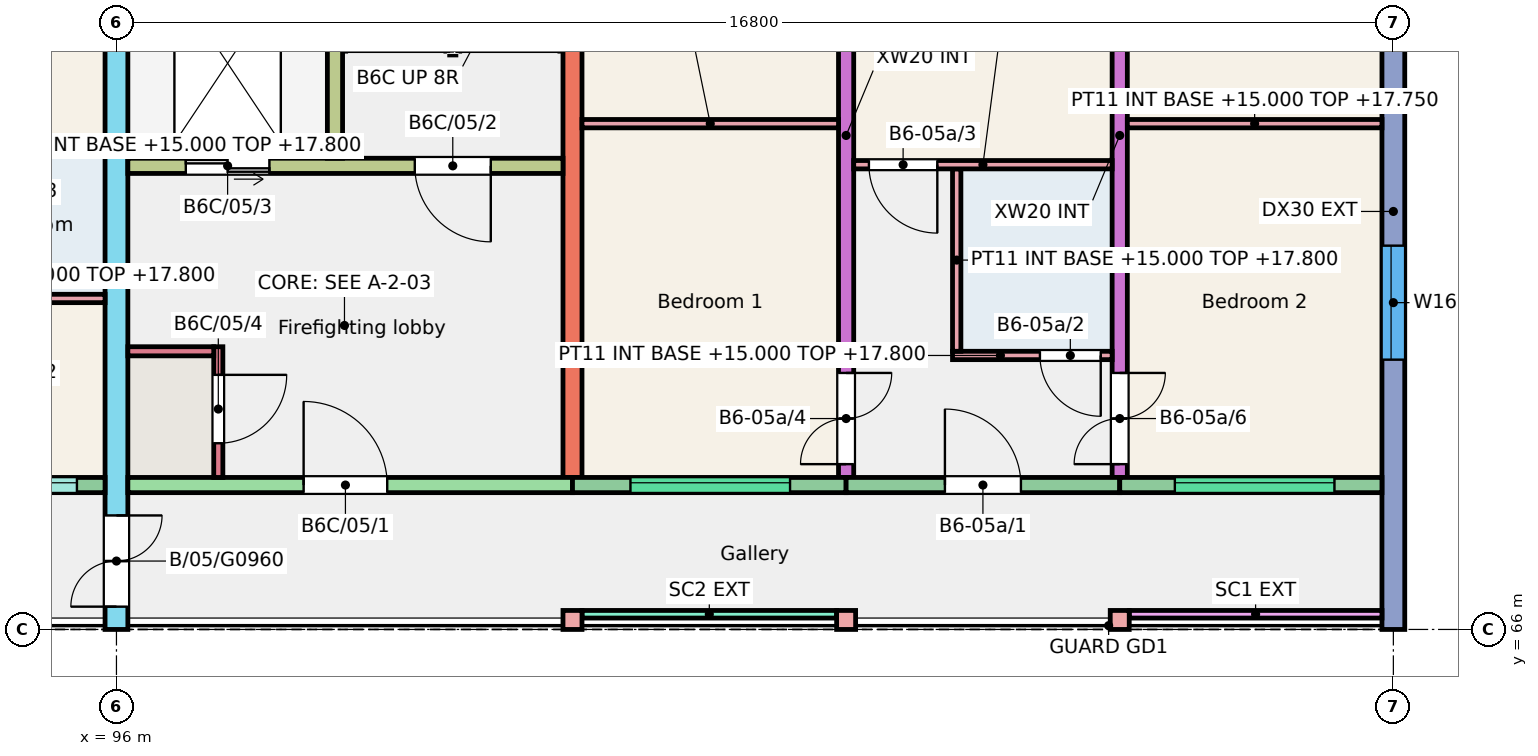
"""IFC4 building model, lengths in metres.
Left out: names, types, materials, properties, quantities, classifications, styles, units other than length and angle.
Written with IfcOpenShell. Run it as: python <this file> out.ifc"""

import sys

from ifc_helpers import new_model, si_unit, direction, frame, frame_2d, origin, origin_2d, place, context, subcontext, project, spatial, rectangle, extrude, element, fill, save


model = new_model("IFC4")
c1 = context("Model", 3, precision=1e-05, world=origin(), true_north=direction((0.0, 1.0)))
c2 = subcontext(c1, "Body", "Model", "MODEL_VIEW")
j1 = project(units=[si_unit("LENGTHUNIT", "METRE"), si_unit("PLANEANGLEUNIT", "RADIAN")], contexts=[c1])
p1 = place(None, origin())
s1 = spatial("IfcSite", under=j1, at=p1, CompositionType="ELEMENT")
p2 = place(p1, origin())
s2 = spatial("IfcBuilding", under=s1, at=p2, CompositionType="ELEMENT")
p3 = place(p2, frame((0.0, 0.0, 15.0)))
s3 = spatial("IfcBuildingStorey", under=s2, at=p3, CompositionType="ELEMENT", Elevation=15.0)
p4 = place(p3, frame((96.0, 66.0, 0.0), z_axis=(0.0, 0.0, 1.0), x_axis=(0.0, 1.0, 0.0)))
e1 = element("IfcWall", 1, at=p4, inside=s3, PredefinedType="SHEAR", context=c2, shape_type="SweptSolid", body=[
    extrude(rectangle(XDim=11.0, YDim=0.3, at=frame_2d((5.5, 0.0))), origin(), (0.0, 0.0, 1.0), 3.0),
])
p5 = place(p4, frame((0.3, 0.0, 0.0)))
e2 = element("IfcOpeningElement", 2, at=p5, cuts=e1, PredefinedType="OPENING", context=c2, shape_type="SweptSolid", body=[
    extrude(rectangle(XDim=1.2, YDim=2.1, at=frame_2d((0.6, 1.05))), frame((0.0, 0.16, 0.0), z_axis=(0.0, -1.0, 0.0), x_axis=(1.0, 0.0, 0.0)), (0.0, 0.0, 1.0), 0.32),
])
p6 = place(p3, frame((102.0, 68.0, 0.0), z_axis=(0.0, 0.0, 1.0), x_axis=(0.0, 1.0, 0.0)))
e3 = element("IfcWall", 3, at=p6, inside=s3, PredefinedType="SHEAR", context=c2, shape_type="SweptSolid", body=[
    extrude(rectangle(XDim=9.0, YDim=0.25, at=frame_2d((4.5, 0.0))), origin(), (0.0, 0.0, 1.0), 3.0),
])
p7 = place(p3, frame((105.6, 68.0, 0.0), z_axis=(0.0, 0.0, 1.0), x_axis=(0.0, 1.0, 0.0)))
e4 = element("IfcWall", 4, at=p7, inside=s3, PredefinedType="SHEAR", context=c2, shape_type="SweptSolid", body=[
    extrude(rectangle(XDim=9.0, YDim=0.2, at=frame_2d((4.5, 0.0))), origin(), (0.0, 0.0, 1.0), 3.0),
])
p8 = place(p7, frame((0.175, 0.0, 0.0)))
e5 = element("IfcOpeningElement", 5, at=p8, cuts=e4, PredefinedType="OPENING", context=c2, shape_type="SweptSolid", body=[
    extrude(rectangle(XDim=1.2, YDim=2.1, at=frame_2d((0.6, 1.05))), frame((0.0, 0.11, 0.0), z_axis=(0.0, -1.0, 0.0), x_axis=(1.0, 0.0, 0.0)), (0.0, 0.0, 1.0), 0.22),
])
p9 = place(p7, frame((6.4, 0.0, 0.0)))
e6 = element("IfcOpeningElement", 6, at=p9, cuts=e4, PredefinedType="OPENING", context=c2, shape_type="SweptSolid", body=[
    extrude(rectangle(XDim=1.2, YDim=2.1, at=frame_2d((0.6, 1.05))), frame((0.0, 0.11, 0.0), z_axis=(0.0, -1.0, 0.0), x_axis=(1.0, 0.0, 0.0)), (0.0, 0.0, 1.0), 0.22),
])
p10 = place(p3, frame((109.2, 68.0, 0.0), z_axis=(0.0, 0.0, 1.0), x_axis=(0.0, 1.0, 0.0)))
e7 = element("IfcWall", 7, at=p10, inside=s3, PredefinedType="SHEAR", context=c2, shape_type="SweptSolid", body=[
    extrude(rectangle(XDim=9.0, YDim=0.2, at=frame_2d((4.5, 0.0))), origin(), (0.0, 0.0, 1.0), 3.0),
])
p11 = place(p10, frame((0.175, 0.0, 0.0)))
e8 = element("IfcOpeningElement", 8, at=p11, cuts=e7, PredefinedType="OPENING", context=c2, shape_type="SweptSolid", body=[
    extrude(rectangle(XDim=1.2, YDim=2.1, at=frame_2d((0.6, 1.05))), frame((0.0, 0.11, 0.0), z_axis=(0.0, -1.0, 0.0), x_axis=(1.0, 0.0, 0.0)), (0.0, 0.0, 1.0), 0.22),
])
p12 = place(p10, frame((6.4, 0.0, 0.0)))
e9 = element("IfcOpeningElement", 9, at=p12, cuts=e7, PredefinedType="OPENING", context=c2, shape_type="SweptSolid", body=[
    extrude(rectangle(XDim=1.2, YDim=2.1, at=frame_2d((0.6, 1.05))), frame((0.0, 0.11, 0.0), z_axis=(0.0, -1.0, 0.0), x_axis=(1.0, 0.0, 0.0)), (0.0, 0.0, 1.0), 0.22),
])
p13 = place(p3, frame((112.8, 66.0, 0.0), z_axis=(0.0, 0.0, 1.0), x_axis=(0.0, 1.0, 0.0)))
e10 = element("IfcWall", 10, at=p13, inside=s3, PredefinedType="SHEAR", context=c2, shape_type="SweptSolid", body=[
    extrude(rectangle(XDim=11.0, YDim=0.3, at=frame_2d((5.5, 0.0))), origin(), (0.0, 0.0, 1.0), 3.0),
])
p14 = place(p13, frame((3.55, 0.0, 0.9)))
e11 = element("IfcOpeningElement", 11, at=p14, cuts=e10, PredefinedType="OPENING", context=c2, shape_type="SweptSolid", body=[
    extrude(rectangle(XDim=1.5, YDim=1.5, at=frame_2d((0.75, 0.75))), frame((0.0, 0.16, 0.0), z_axis=(0.0, -1.0, 0.0), x_axis=(1.0, 0.0, 0.0)), (0.0, 0.0, 1.0), 0.32),
])
p15 = place(p13, frame((8.255, 0.0, 0.9)))
e12 = element("IfcOpeningElement", 12, at=p15, cuts=e10, PredefinedType="OPENING", context=c2, shape_type="SweptSolid", body=[
    extrude(rectangle(XDim=1.2, YDim=1.5, at=frame_2d((0.6, 0.75))), frame((0.0, 0.16, 0.0), z_axis=(0.0, -1.0, 0.0), x_axis=(1.0, 0.0, 0.0)), (0.0, 0.0, 1.0), 0.32),
])
p16 = place(p3, frame((92.4, 67.9, 0.0), z_axis=(0.0, 0.0, 1.0), x_axis=(1.0, 0.0, 0.0)))
e13 = element("IfcWall", 13, at=p16, inside=s3, PredefinedType="SOLIDWALL", context=c2, shape_type="SweptSolid", body=[
    extrude(rectangle(XDim=3.45, YDim=0.2, at=frame_2d((1.725, 0.0))), origin(), (0.0, 0.0, 1.0), 3.0),
])
p17 = place(p16, frame((1.88, 0.0, 1.1)))
e14 = element("IfcOpeningElement", 14, at=p17, cuts=e13, PredefinedType="OPENING", context=c2, shape_type="SweptSolid", body=[
    extrude(rectangle(XDim=1.2, YDim=1.3, at=frame_2d((0.6, 0.65))), frame((0.0, 0.11, 0.0), z_axis=(0.0, -1.0, 0.0), x_axis=(1.0, 0.0, 0.0)), (0.0, 0.0, 1.0), 0.22),
])
p18 = place(p16, frame((0.25, 0.0, 0.0)))
e15 = element("IfcOpeningElement", 15, at=p18, cuts=e13, PredefinedType="OPENING", context=c2, shape_type="SweptSolid", body=[
    extrude(rectangle(XDim=1.0, YDim=2.1, at=frame_2d((0.5, 1.05))), frame((0.0, 0.11, 0.0), z_axis=(0.0, -1.0, 0.0), x_axis=(1.0, 0.0, 0.0)), (0.0, 0.0, 1.0), 0.22),
])
p19 = place(p3, frame((96.15, 67.9, 0.0), z_axis=(0.0, 0.0, 1.0), x_axis=(1.0, 0.0, 0.0)))
e16 = element("IfcWall", 16, at=p19, inside=s3, PredefinedType="SHEAR", context=c2, shape_type="SweptSolid", body=[
    extrude(rectangle(XDim=5.85, YDim=0.2, at=frame_2d((2.925, 0.0))), origin(), (0.0, 0.0, 1.0), 3.0),
])
p20 = place(p19, frame((2.312, 0.0, 0.0)))
e17 = element("IfcOpeningElement", 17, at=p20, cuts=e16, PredefinedType="OPENING", context=c2, shape_type="SweptSolid", body=[
    extrude(rectangle(XDim=1.1, YDim=2.1, at=frame_2d((0.55, 1.05))), frame((0.0, 0.11, 0.0), z_axis=(0.0, -1.0, 0.0), x_axis=(1.0, 0.0, 0.0)), (0.0, 0.0, 1.0), 0.22),
])
p21 = place(p3, frame((96.15, 72.1, 0.0), z_axis=(0.0, 0.0, 1.0), x_axis=(1.0, 0.0, 0.0)))
e18 = element("IfcWall", 18, at=p21, inside=s3, PredefinedType="SHEAR", context=c2, shape_type="SweptSolid", body=[
    extrude(rectangle(XDim=5.725, YDim=0.2, at=frame_2d((2.863, 0.0))), origin(), (0.0, 0.0, 1.0), 3.0),
])
p22 = place(p21, frame((3.775, 0.0, 0.0)))
e19 = element("IfcOpeningElement", 19, at=p22, cuts=e18, PredefinedType="OPENING", context=c2, shape_type="SweptSolid", body=[
    extrude(rectangle(XDim=1.0, YDim=2.1, at=frame_2d((0.5, 1.05))), frame((0.0, 0.11, 0.0), z_axis=(0.0, -1.0, 0.0), x_axis=(1.0, 0.0, 0.0)), (0.0, 0.0, 1.0), 0.22),
])
p23 = place(p21, frame((0.762, 0.0, 0.0)))
e20 = element("IfcOpeningElement", 20, at=p23, cuts=e18, PredefinedType="OPENING", context=c2, shape_type="SweptSolid", body=[
    extrude(rectangle(XDim=1.1, YDim=2.1, at=frame_2d((0.55, 1.05))), frame((0.0, 0.11, 0.0), z_axis=(0.0, -1.0, 0.0), x_axis=(1.0, 0.0, 0.0)), (0.0, 0.0, 1.0), 0.22),
])
p24 = place(p3, frame((98.875, 72.2, 0.0), z_axis=(0.0, 0.0, 1.0), x_axis=(0.0, 1.0, 0.0)))
e21 = element("IfcWall", 21, at=p24, inside=s3, PredefinedType="SHEAR", context=c2, shape_type="SweptSolid", body=[
    extrude(rectangle(XDim=4.8, YDim=0.2, at=frame_2d((2.4, 0.0))), origin(), (0.0, 0.0, 1.0), 3.0),
])
p25 = place(p3, frame((97.34, 68.0, 0.0), z_axis=(0.0, 0.0, 1.0), x_axis=(0.0, 1.0, 0.0)))
e22 = element("IfcWall", 22, at=p25, inside=s3, PredefinedType="SHEAR", context=c2, shape_type="SweptSolid", body=[
    extrude(rectangle(XDim=1.72, YDim=0.12, at=frame_2d((0.86, 0.0))), origin(), (0.0, 0.0, 1.0), 3.0),
])
p26 = place(p25, frame((0.45, 0.0, 0.0)))
e23 = element("IfcOpeningElement", 23, at=p26, cuts=e22, PredefinedType="OPENING", context=c2, shape_type="SweptSolid", body=[
    extrude(rectangle(XDim=0.9, YDim=2.1, at=frame_2d((0.45, 1.05))), frame((0.0, 0.07, 0.0), z_axis=(0.0, -1.0, 0.0), x_axis=(1.0, 0.0, 0.0)), (0.0, 0.0, 1.0), 0.14),
])
p27 = place(p3, frame((96.15, 69.66, 0.0), z_axis=(0.0, 0.0, 1.0), x_axis=(1.0, 0.0, 0.0)))
e24 = element("IfcWall", 24, at=p27, inside=s3, PredefinedType="SHEAR", context=c2, shape_type="SweptSolid", body=[
    extrude(rectangle(XDim=1.13, YDim=0.12, at=frame_2d((0.565, 0.0))), origin(), (0.0, 0.0, 1.0), 3.0),
])
p28 = place(p3, frame((102.0, 67.9, 0.0), z_axis=(0.0, 0.0, 1.0), x_axis=(1.0, 0.0, 0.0)))
e25 = element("IfcWall", 25, at=p28, inside=s3, PredefinedType="SOLIDWALL", context=c2, shape_type="SweptSolid", body=[
    extrude(rectangle(XDim=3.6, YDim=0.2, at=frame_2d((1.8, 0.0))), origin(), (0.0, 0.0, 1.0), 3.0),
])
p29 = place(p28, frame((0.762, 0.0, 1.2)))
e26 = element("IfcOpeningElement", 26, at=p29, cuts=e25, PredefinedType="OPENING", context=c2, shape_type="SweptSolid", body=[
    extrude(rectangle(XDim=2.1, YDim=1.2, at=frame_2d((1.05, 0.6))), frame((0.0, 0.11, 0.0), z_axis=(0.0, -1.0, 0.0), x_axis=(1.0, 0.0, 0.0)), (0.0, 0.0, 1.0), 0.22),
])
p30 = place(p3, frame((105.6, 67.9, 0.0), z_axis=(0.0, 0.0, 1.0), x_axis=(1.0, 0.0, 0.0)))
e27 = element("IfcWall", 27, at=p30, inside=s3, PredefinedType="SOLIDWALL", context=c2, shape_type="SweptSolid", body=[
    extrude(rectangle(XDim=3.6, YDim=0.2, at=frame_2d((1.8, 0.0))), origin(), (0.0, 0.0, 1.0), 3.0),
])
p31 = place(p30, frame((1.3, 0.0, 0.0)))
e28 = element("IfcOpeningElement", 28, at=p31, cuts=e27, PredefinedType="OPENING", context=c2, shape_type="SweptSolid", body=[
    extrude(rectangle(XDim=1.0, YDim=2.1, at=frame_2d((0.5, 1.05))), frame((0.0, 0.11, 0.0), z_axis=(0.0, -1.0, 0.0), x_axis=(1.0, 0.0, 0.0)), (0.0, 0.0, 1.0), 0.22),
])
p32 = place(p3, frame((109.2, 67.9, 0.0), z_axis=(0.0, 0.0, 1.0), x_axis=(1.0, 0.0, 0.0)))
e29 = element("IfcWall", 29, at=p32, inside=s3, PredefinedType="SOLIDWALL", context=c2, shape_type="SweptSolid", body=[
    extrude(rectangle(XDim=3.45, YDim=0.2, at=frame_2d((1.725, 0.0))), origin(), (0.0, 0.0, 1.0), 3.0),
])
p33 = place(p32, frame((0.725, 0.0, 1.2)))
e30 = element("IfcOpeningElement", 30, at=p33, cuts=e29, PredefinedType="OPENING", context=c2, shape_type="SweptSolid", body=[
    extrude(rectangle(XDim=2.1, YDim=1.2, at=frame_2d((1.05, 0.6))), frame((0.0, 0.11, 0.0), z_axis=(0.0, -1.0, 0.0), x_axis=(1.0, 0.0, 0.0)), (0.0, 0.0, 1.0), 0.22),
])
for number, where, z_axis, x_axis in (
    (31, (102.0, 66.125, 0.0), (0.0, 0.0, 1.0), (1.0, 0.0, 0.0)),
    (32, (105.6, 66.125, 0.0), (0.0, 0.0, 1.0), (1.0, 0.0, 0.0)),
    (33, (109.2, 66.125, 0.0), (0.0, 0.0, 1.0), (1.0, 0.0, 0.0)),
):
    element("IfcColumn", number, at=place(p3, frame(where, z_axis=z_axis, x_axis=x_axis)), inside=s3, PredefinedType="COLUMN", context=c2, shape_type="SweptSolid", body=[
        extrude(rectangle(XDim=0.25, YDim=0.25, at=origin_2d()), origin(), (0.0, 0.0, 1.0), 3.0),
    ])
p34 = place(p3, frame((102.125, 66.2, 0.0), z_axis=(0.0, 0.0, 1.0), x_axis=(1.0, 0.0, 0.0)))
e34 = element("IfcWall", 34, at=p34, inside=s3, PredefinedType="SOLIDWALL", context=c2, shape_type="SweptSolid", body=[
    extrude(rectangle(XDim=3.35, YDim=0.1, at=frame_2d((1.675, 0.0))), origin(), (0.0, 0.0, 1.0), 2.45),
])
p35 = place(p3, frame((109.325, 66.2, 0.0), z_axis=(0.0, 0.0, 1.0), x_axis=(1.0, 0.0, 0.0)))
e35 = element("IfcWall", 35, at=p35, inside=s3, PredefinedType="SOLIDWALL", context=c2, shape_type="SweptSolid", body=[
    extrude(rectangle(XDim=3.325, YDim=0.1, at=frame_2d((1.663, 0.0))), origin(), (0.0, 0.0, 1.0), 2.45),
])
p36 = place(p3, frame((93.91, 70.355, 0.0), z_axis=(0.0, 0.0, 1.0), x_axis=(1.0, 0.0, 0.0)))
e36 = element("IfcWall", 36, at=p36, inside=s3, PredefinedType="PARTITIONING", context=c2, shape_type="SweptSolid", body=[
    extrude(rectangle(XDim=1.94, YDim=0.11, at=frame_2d((0.97, 0.0))), origin(), (0.0, 0.0, 1.0), 2.8),
])
p37 = place(p3, frame((92.5, 72.355, 0.0), z_axis=(0.0, 0.0, 1.0), x_axis=(1.0, 0.0, 0.0)))
e37 = element("IfcWall", 37, at=p37, inside=s3, PredefinedType="PARTITIONING", context=c2, shape_type="SweptSolid", body=[
    extrude(rectangle(XDim=3.35, YDim=0.11, at=frame_2d((1.675, 0.0))), origin(), (0.0, 0.0, 1.0), 2.8),
])
p38 = place(p37, frame((0.2, 0.0, 0.0)))
e38 = element("IfcOpeningElement", 38, at=p38, cuts=e37, PredefinedType="OPENING", context=c2, shape_type="SweptSolid", body=[
    extrude(rectangle(XDim=0.9, YDim=2.1, at=frame_2d((0.45, 1.05))), frame((0.0, 0.065, 0.0), z_axis=(0.0, -1.0, 0.0), x_axis=(1.0, 0.0, 0.0)), (0.0, 0.0, 1.0), 0.13),
])
p39 = place(p3, frame((107.0, 69.605, 0.0), z_axis=(0.0, 0.0, 1.0), x_axis=(1.0, 0.0, 0.0)))
e39 = element("IfcWall", 39, at=p39, inside=s3, PredefinedType="PARTITIONING", context=c2, shape_type="SweptSolid", body=[
    extrude(rectangle(XDim=2.1, YDim=0.11, at=frame_2d((1.05, 0.0))), origin(), (0.0, 0.0, 1.0), 2.8),
])
p40 = place(p39, frame((1.15, 0.0, 0.0)))
e40 = element("IfcOpeningElement", 40, at=p40, cuts=e39, PredefinedType="OPENING", context=c2, shape_type="SweptSolid", body=[
    extrude(rectangle(XDim=0.8, YDim=2.1, at=frame_2d((0.4, 1.05))), frame((0.0, 0.065, 0.0), z_axis=(0.0, -1.0, 0.0), x_axis=(1.0, 0.0, 0.0)), (0.0, 0.0, 1.0), 0.13),
])
p41 = place(p3, frame((107.055, 69.66, 0.0), z_axis=(0.0, 0.0, 1.0), x_axis=(0.0, 1.0, 0.0)))
e41 = element("IfcWall", 41, at=p41, inside=s3, PredefinedType="PARTITIONING", context=c2, shape_type="SweptSolid", body=[
    extrude(rectangle(XDim=2.4, YDim=0.11, at=frame_2d((1.2, 0.0))), origin(), (0.0, 0.0, 1.0), 2.8),
])
p42 = place(p3, frame((105.7, 72.115, 0.0), z_axis=(0.0, 0.0, 1.0), x_axis=(1.0, 0.0, 0.0)))
e42 = element("IfcWall", 42, at=p42, inside=s3, PredefinedType="PARTITIONING", context=c2, shape_type="SweptSolid", body=[
    extrude(rectangle(XDim=3.4, YDim=0.11, at=frame_2d((1.7, 0.0))), origin(), (0.0, 0.0, 1.0), 2.8),
])
p43 = place(p42, frame((0.2, 0.0, 0.0)))
e43 = element("IfcOpeningElement", 43, at=p43, cuts=e42, PredefinedType="OPENING", context=c2, shape_type="SweptSolid", body=[
    extrude(rectangle(XDim=0.9, YDim=2.1, at=frame_2d((0.45, 1.05))), frame((0.0, 0.065, 0.0), z_axis=(0.0, -1.0, 0.0), x_axis=(1.0, 0.0, 0.0)), (0.0, 0.0, 1.0), 0.13),
])
p44 = place(p3, frame((102.125, 72.655, 0.0), z_axis=(0.0, 0.0, 1.0), x_axis=(1.0, 0.0, 0.0)))
e44 = element("IfcWall", 44, at=p44, inside=s3, PredefinedType="PARTITIONING", context=c2, shape_type="SweptSolid", body=[
    extrude(rectangle(XDim=3.375, YDim=0.11, at=frame_2d((1.688, 0.0))), origin(), (0.0, 0.0, 1.0), 2.8),
])
p45 = place(p3, frame((109.3, 72.655, 0.0), z_axis=(0.0, 0.0, 1.0), x_axis=(1.0, 0.0, 0.0)))
e45 = element("IfcWall", 45, at=p45, inside=s3, PredefinedType="PARTITIONING", context=c2, shape_type="SweptSolid", body=[
    extrude(rectangle(XDim=3.35, YDim=0.11, at=frame_2d((1.675, 0.0))), origin(), (0.0, 0.0, 1.0), 2.75),
])
p46 = place(p17, origin())
e46 = element("IfcWindow", 46, at=p46, inside=s3, PartitioningType="SINGLE_PANEL", PredefinedType="WINDOW", context=c2, shape_type="SweptSolid", body=[
    extrude(rectangle(XDim=1.2, YDim=1.3, at=frame_2d((0.6, 0.65))), frame((0.0, 0.06, 0.0), z_axis=(0.0, -1.0, 0.0), x_axis=(1.0, 0.0, 0.0)), (0.0, 0.0, 1.0), 0.06),
])
fill(e14, e46)
p47 = place(p29, origin())
e47 = element("IfcWindow", 47, at=p47, inside=s3, PartitioningType="SINGLE_PANEL", PredefinedType="WINDOW", context=c2, shape_type="SweptSolid", body=[
    extrude(rectangle(XDim=2.1, YDim=1.2, at=frame_2d((1.05, 0.6))), frame((0.0, 0.06, 0.0), z_axis=(0.0, -1.0, 0.0), x_axis=(1.0, 0.0, 0.0)), (0.0, 0.0, 1.0), 0.06),
])
fill(e26, e47)
p48 = place(p33, origin())
e48 = element("IfcWindow", 48, at=p48, inside=s3, PartitioningType="SINGLE_PANEL", PredefinedType="WINDOW", context=c2, shape_type="SweptSolid", body=[
    extrude(rectangle(XDim=2.1, YDim=1.2, at=frame_2d((1.05, 0.6))), frame((0.0, 0.06, 0.0), z_axis=(0.0, -1.0, 0.0), x_axis=(1.0, 0.0, 0.0)), (0.0, 0.0, 1.0), 0.06),
])
fill(e30, e48)
p49 = place(p14, origin())
e49 = element("IfcWindow", 49, at=p49, inside=s3, PartitioningType="SINGLE_PANEL", PredefinedType="WINDOW", context=c2, shape_type="SweptSolid", body=[
    extrude(rectangle(XDim=1.5, YDim=1.5, at=frame_2d((0.75, 0.75))), frame((0.0, 0.06, 0.0), z_axis=(0.0, -1.0, 0.0), x_axis=(1.0, 0.0, 0.0)), (0.0, 0.0, 1.0), 0.06),
])
fill(e11, e49)
p50 = place(p31, origin())
e50 = element("IfcDoor", 50, at=p50, inside=s3, OperationType="SINGLE_SWING_LEFT", PredefinedType="DOOR", context=c2, shape_type="SweptSolid", body=[
    extrude(rectangle(XDim=1.0, YDim=2.1, at=frame_2d((0.5, 1.05))), frame((0.0, 0.025, 0.0), z_axis=(0.0, -1.0, 0.0), x_axis=(1.0, 0.0, 0.0)), (0.0, 0.0, 1.0), 0.05),
])
fill(e28, e50)
p51 = place(p40, origin())
e51 = element("IfcDoor", 51, at=p51, inside=s3, OperationType="SINGLE_SWING_RIGHT", PredefinedType="DOOR", context=c2, shape_type="SweptSolid", body=[
    extrude(rectangle(XDim=0.8, YDim=2.1, at=frame_2d((0.4, 1.05))), frame((0.0, 0.025, 0.0), z_axis=(0.0, -1.0, 0.0), x_axis=(1.0, 0.0, 0.0)), (0.0, 0.0, 1.0), 0.05),
])
fill(e40, e51)
p52 = place(p43, origin())
e52 = element("IfcDoor", 52, at=p52, inside=s3, OperationType="SINGLE_SWING_RIGHT", PredefinedType="DOOR", context=c2, shape_type="SweptSolid", body=[
    extrude(rectangle(XDim=0.9, YDim=2.1, at=frame_2d((0.45, 1.05))), frame((0.0, 0.025, 0.0), z_axis=(0.0, -1.0, 0.0), x_axis=(1.0, 0.0, 0.0)), (0.0, 0.0, 1.0), 0.05),
])
fill(e43, e52)
p53 = place(p8, origin())
e53 = element("IfcDoor", 53, at=p53, inside=s3, OperationType="DOUBLE_DOOR_SINGLE_SWING", PredefinedType="DOOR", context=c2, shape_type="SweptSolid", body=[
    extrude(rectangle(XDim=1.2, YDim=2.1, at=frame_2d((0.6, 1.05))), frame((0.0, 0.025, 0.0), z_axis=(0.0, -1.0, 0.0), x_axis=(1.0, 0.0, 0.0)), (0.0, 0.0, 1.0), 0.05),
])
fill(e5, e53)
p54 = place(p11, origin())
e54 = element("IfcDoor", 54, at=p54, inside=s3, OperationType="DOUBLE_DOOR_SINGLE_SWING", PredefinedType="DOOR", context=c2, shape_type="SweptSolid", body=[
    extrude(rectangle(XDim=1.2, YDim=2.1, at=frame_2d((0.6, 1.05))), frame((0.0, 0.025, 0.0), z_axis=(0.0, -1.0, 0.0), x_axis=(1.0, 0.0, 0.0)), (0.0, 0.0, 1.0), 0.05),
])
fill(e8, e54)
p55 = place(p20, origin())
e55 = element("IfcDoor", 55, at=p55, inside=s3, OperationType="SINGLE_SWING_LEFT", PredefinedType="DOOR", context=c2, shape_type="SweptSolid", body=[
    extrude(rectangle(XDim=1.1, YDim=2.1, at=frame_2d((0.55, 1.05))), frame((0.0, 0.025, 0.0), z_axis=(0.0, -1.0, 0.0), x_axis=(1.0, 0.0, 0.0)), (0.0, 0.0, 1.0), 0.05),
])
fill(e17, e55)
p56 = place(p22, origin())
e56 = element("IfcDoor", 56, at=p56, inside=s3, OperationType="SINGLE_SWING_RIGHT", PredefinedType="DOOR", context=c2, shape_type="SweptSolid", body=[
    extrude(rectangle(XDim=1.0, YDim=2.1, at=frame_2d((0.5, 1.05))), frame((0.0, 0.025, 0.0), z_axis=(0.0, -1.0, 0.0), x_axis=(1.0, 0.0, 0.0)), (0.0, 0.0, 1.0), 0.05),
])
fill(e19, e56)
p57 = place(p23, origin())
e57 = element("IfcDoor", 57, at=p57, inside=s3, OperationType="DOUBLE_DOOR_SLIDING", PredefinedType="DOOR", context=c2, shape_type="SweptSolid", body=[
    extrude(rectangle(XDim=1.1, YDim=2.1, at=frame_2d((0.55, 1.05))), frame((0.0, 0.025, 0.0), z_axis=(0.0, -1.0, 0.0), x_axis=(1.0, 0.0, 0.0)), (0.0, 0.0, 1.0), 0.05),
])
fill(e20, e57)
p58 = place(p26, origin())
e58 = element("IfcDoor", 58, at=p58, inside=s3, OperationType="SINGLE_SWING_RIGHT", PredefinedType="DOOR", context=c2, shape_type="SweptSolid", body=[
    extrude(rectangle(XDim=0.9, YDim=2.1, at=frame_2d((0.45, 1.05))), frame((0.0, 0.025, 0.0), z_axis=(0.0, -1.0, 0.0), x_axis=(1.0, 0.0, 0.0)), (0.0, 0.0, 1.0), 0.05),
])
fill(e23, e58)
p59 = place(p5, origin())
e59 = element("IfcDoor", 59, at=p59, inside=s3, OperationType="DOUBLE_DOOR_SINGLE_SWING", PredefinedType="DOOR", context=c2, shape_type="SweptSolid", body=[
    extrude(rectangle(XDim=1.2, YDim=2.1, at=frame_2d((0.6, 1.05))), frame((0.0, 0.025, 0.0), z_axis=(0.0, -1.0, 0.0), x_axis=(1.0, 0.0, 0.0)), (0.0, 0.0, 1.0), 0.05),
])
fill(e2, e59)
save(model, sys.argv[1])
